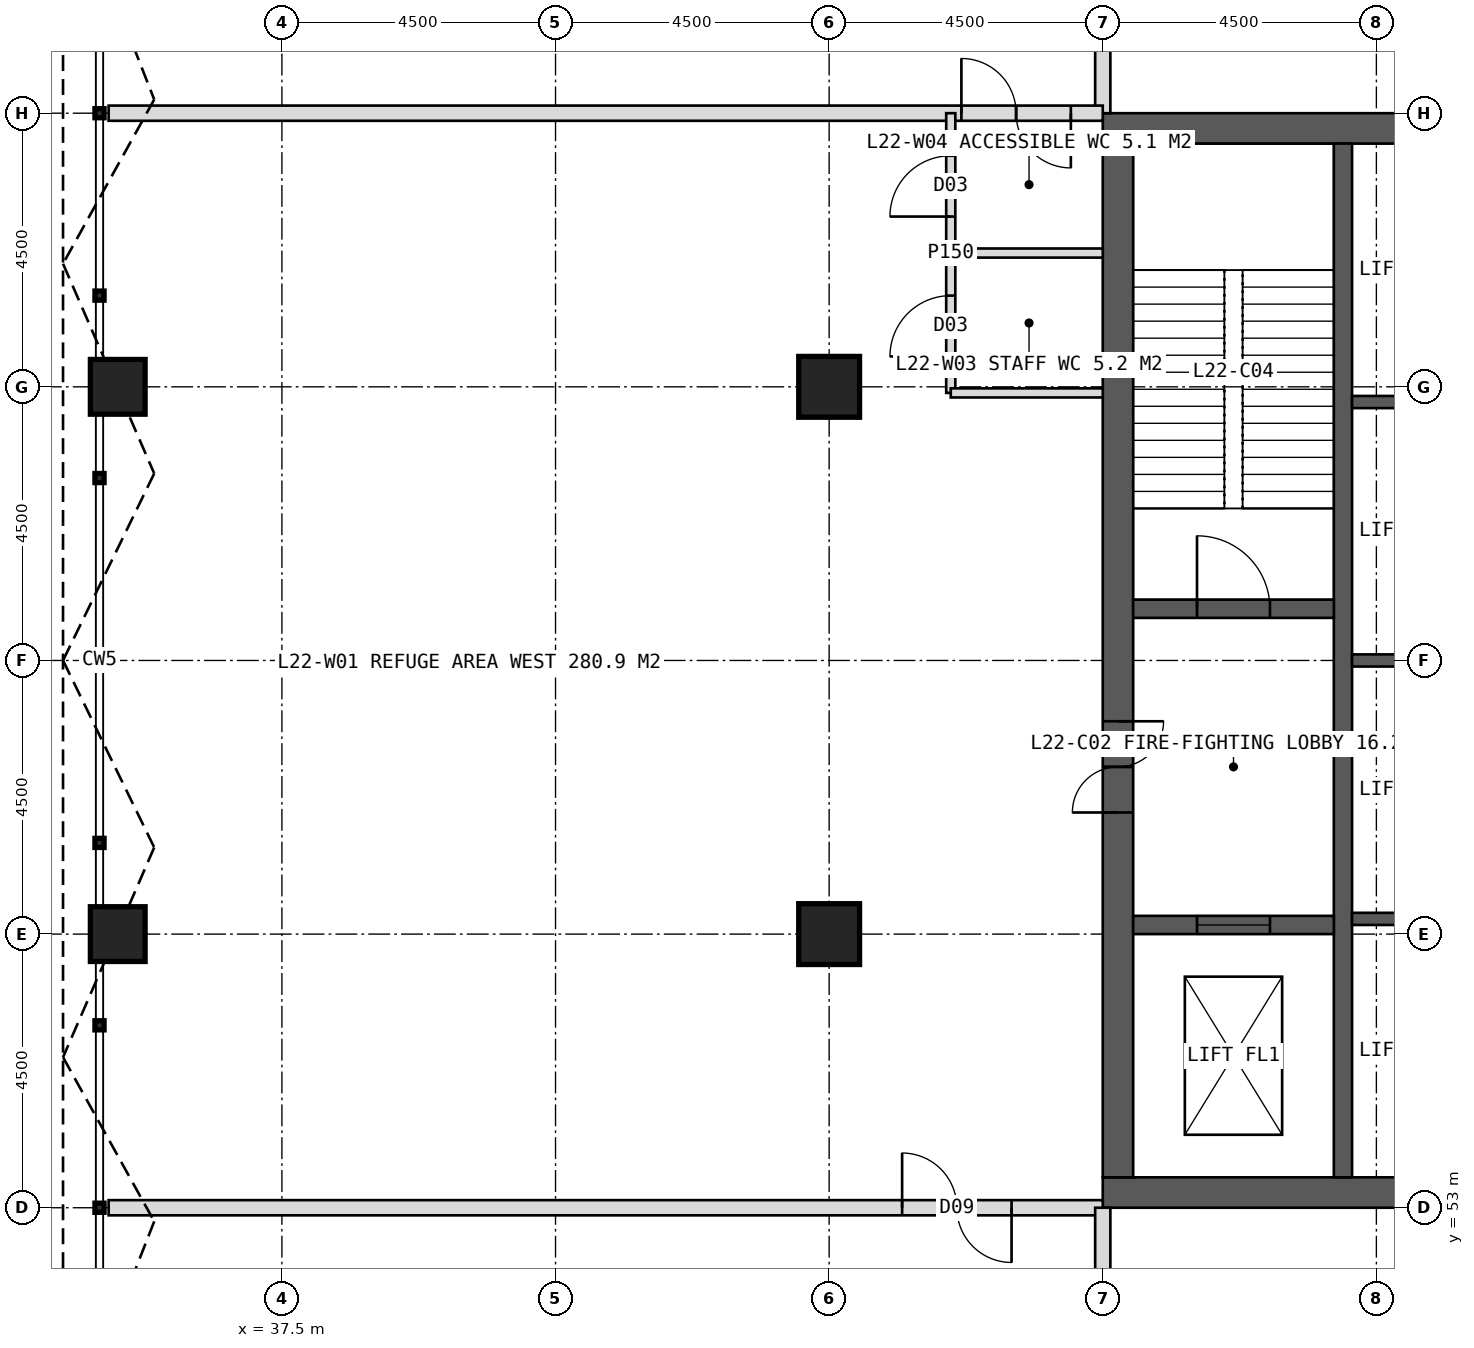
"""IFC4 building model, lengths in metres.
Left out: names, types, materials, properties, quantities, classifications, styles, units other than length and angle.
Written with IfcOpenShell. Run it as: python <this file> out.ifc"""

import sys

from ifc_helpers import new_model, si_unit, direction, frame, frame_2d, origin, origin_2d, place, context, subcontext, project, spatial, rectangle, hollow_rectangle, extrude, element, fill, save


model = new_model("IFC4")
c1 = context("Model", 3, precision=1e-05, world=origin(), true_north=direction((0.0, 1.0)))
c2 = subcontext(c1, "Body", "Model", "MODEL_VIEW")
j1 = project(units=[si_unit("LENGTHUNIT", "METRE"), si_unit("PLANEANGLEUNIT", "RADIAN")], contexts=[c1])
p1 = place(None, origin())
s1 = spatial("IfcSite", under=j1, at=p1, CompositionType="ELEMENT")
p2 = place(p1, origin())
s2 = spatial("IfcBuilding", under=s1, at=p2, CompositionType="ELEMENT")
p3 = place(p2, frame((0.0, 0.0, 95.0)))
s3 = spatial("IfcBuildingStorey", under=s2, at=p3, CompositionType="ELEMENT", Elevation=95.0)
p4 = place(p3, frame((51.0, 70.75, 0.0), z_axis=(0.0, 0.0, 1.0), x_axis=(1.0, 0.0, 0.0)))
e1 = element("IfcWall", 1, at=p4, inside=s3, PredefinedType="SHEAR", context=c2, shape_type="SweptSolid", body=[
    extrude(rectangle(XDim=18.0, YDim=0.5, at=frame_2d((9.0, 0.0))), origin(), (0.0, 0.0, 1.0), 5.0),
])
p5 = place(p4, frame((8.1, 0.0, 0.0)))
e2 = element("IfcOpeningElement", 2, at=p5, cuts=e1, PredefinedType="OPENING", context=c2, shape_type="SweptSolid", body=[
    extrude(rectangle(XDim=1.8, YDim=2.2, at=frame_2d((0.9, 1.1))), frame((0.0, 0.26, 0.0), z_axis=(0.0, -1.0, 0.0), x_axis=(1.0, 0.0, 0.0)), (0.0, 0.0, 1.0), 0.52),
])
p6 = place(p3, frame((51.0, 53.25, 0.0), z_axis=(0.0, 0.0, 1.0), x_axis=(1.0, 0.0, 0.0)))
e3 = element("IfcWall", 3, at=p6, inside=s3, PredefinedType="SHEAR", context=c2, shape_type="SweptSolid", body=[
    extrude(rectangle(XDim=18.0, YDim=0.5, at=frame_2d((9.0, 0.0))), origin(), (0.0, 0.0, 1.0), 5.0),
])
p7 = place(p6, frame((8.1, 0.0, 0.0)))
e4 = element("IfcOpeningElement", 4, at=p7, cuts=e3, PredefinedType="OPENING", context=c2, shape_type="SweptSolid", body=[
    extrude(rectangle(XDim=1.8, YDim=2.2, at=frame_2d((0.9, 1.1))), frame((0.0, 0.26, 0.0), z_axis=(0.0, -1.0, 0.0), x_axis=(1.0, 0.0, 0.0)), (0.0, 0.0, 1.0), 0.52),
])
p8 = place(p3, frame((51.25, 53.5, 0.0), z_axis=(0.0, 0.0, 1.0), x_axis=(0.0, 1.0, 0.0)))
e5 = element("IfcWall", 5, at=p8, inside=s3, PredefinedType="SHEAR", context=c2, shape_type="SweptSolid", body=[
    extrude(rectangle(XDim=17.0, YDim=0.5, at=frame_2d((8.5, 0.0))), origin(), (0.0, 0.0, 1.0), 5.0),
])
p9 = place(p8, frame((6.0, 0.0, 0.0)))
e6 = element("IfcOpeningElement", 6, at=p9, cuts=e5, PredefinedType="OPENING", context=c2, shape_type="SweptSolid", body=[
    extrude(rectangle(XDim=1.5, YDim=2.2, at=frame_2d((0.75, 1.1))), frame((0.0, 0.26, 0.0), z_axis=(0.0, -1.0, 0.0), x_axis=(1.0, 0.0, 0.0)), (0.0, 0.0, 1.0), 0.52),
])
p10 = place(p3, frame((54.95, 53.5, 0.0), z_axis=(0.0, 0.0, 1.0), x_axis=(0.0, 1.0, 0.0)))
e7 = element("IfcWall", 7, at=p10, inside=s3, PredefinedType="SHEAR", context=c2, shape_type="SweptSolid", body=[
    extrude(rectangle(XDim=17.0, YDim=0.3, at=frame_2d((8.5, 0.0))), origin(), (0.0, 0.0, 1.0), 5.0),
])
for number, where, z_axis, x_axis in (
    (8, (55.1, 57.75, 0.0), (0.0, 0.0, 1.0), (1.0, 0.0, 0.0)),
    (9, (55.1, 62.0, 0.0), (0.0, 0.0, 1.0), (1.0, 0.0, 0.0)),
    (10, (55.1, 66.25, 0.0), (0.0, 0.0, 1.0), (1.0, 0.0, 0.0)),
):
    element("IfcWall", number, at=place(p3, frame(where, z_axis=z_axis, x_axis=x_axis)), inside=s3, PredefinedType="SHEAR", context=c2, shape_type="SweptSolid", body=[
        extrude(rectangle(XDim=3.05, YDim=0.2, at=frame_2d((1.525, 0.0))), origin(), (0.0, 0.0, 1.0), 5.0),
    ])
p11 = place(p3, frame((51.5, 62.85, 0.0), z_axis=(0.0, 0.0, 1.0), x_axis=(1.0, 0.0, 0.0)))
e11 = element("IfcWall", 11, at=p11, inside=s3, PredefinedType="SHEAR", context=c2, shape_type="SweptSolid", body=[
    extrude(rectangle(XDim=3.3, YDim=0.3, at=frame_2d((1.65, 0.0))), origin(), (0.0, 0.0, 1.0), 5.0),
])
p12 = place(p11, frame((1.05, 0.0, 0.0)))
e12 = element("IfcOpeningElement", 12, at=p12, cuts=e11, PredefinedType="OPENING", context=c2, shape_type="SweptSolid", body=[
    extrude(rectangle(XDim=1.2, YDim=2.1, at=frame_2d((0.6, 1.05))), frame((0.0, 0.16, 0.0), z_axis=(0.0, -1.0, 0.0), x_axis=(1.0, 0.0, 0.0)), (0.0, 0.0, 1.0), 0.32),
])
p13 = place(p3, frame((51.5, 57.65, 0.0), z_axis=(0.0, 0.0, 1.0), x_axis=(1.0, 0.0, 0.0)))
e13 = element("IfcWall", 13, at=p13, inside=s3, PredefinedType="SHEAR", context=c2, shape_type="SweptSolid", body=[
    extrude(rectangle(XDim=3.3, YDim=0.3, at=frame_2d((1.65, 0.0))), origin(), (0.0, 0.0, 1.0), 5.0),
])
p14 = place(p13, frame((1.05, 0.0, 0.0)))
e14 = element("IfcOpeningElement", 14, at=p14, cuts=e13, PredefinedType="OPENING", context=c2, shape_type="SweptSolid", body=[
    extrude(rectangle(XDim=1.2, YDim=2.2, at=frame_2d((0.6, 1.1))), frame((0.0, 0.16, 0.0), z_axis=(0.0, -1.0, 0.0), x_axis=(1.0, 0.0, 0.0)), (0.0, 0.0, 1.0), 0.32),
])
for number, where, z_axis, x_axis in (
    (15, (46.5, 57.5, 0.0), (0.0, 0.0, 1.0), (1.0, 0.0, 0.0)),
    (16, (46.5, 66.5, 0.0), (0.0, 0.0, 1.0), (1.0, 0.0, 0.0)),
):
    element("IfcColumn", number, at=place(p3, frame(where, z_axis=z_axis, x_axis=x_axis)), inside=s3, PredefinedType="COLUMN", context=c2, shape_type="SweptSolid", body=[
        extrude(hollow_rectangle(XDim=1.0, YDim=1.0, WallThickness=0.1, at=origin_2d()), origin(), (0.0, 0.0, 1.0), 5.0),
    ])
for number, where, z_axis, x_axis in (
    (17, (34.8, 57.5, 0.0), (0.0, 0.0, 1.0), (1.0, 0.0, 0.0)),
    (18, (34.8, 66.5, 0.0), (0.0, 0.0, 1.0), (1.0, 0.0, 0.0)),
):
    element("IfcColumn", number, at=place(p3, frame(where, z_axis=z_axis, x_axis=x_axis)), inside=s3, PredefinedType="COLUMN", context=c2, shape_type="SweptSolid", body=[
        extrude(hollow_rectangle(XDim=0.9, YDim=0.9, WallThickness=0.08, at=origin_2d()), origin(), (0.0, 0.0, 1.0), 5.0),
    ])
p15 = place(p3, frame((51.0, 71.0, 0.0), z_axis=(0.0, 0.0, 1.0), x_axis=(0.0, 1.0, 0.0)))
e19 = element("IfcWall", 19, at=p15, inside=s3, PredefinedType="SOLIDWALL", context=c2, shape_type="SweptSolid", body=[
    extrude(rectangle(XDim=16.35, YDim=0.25, at=frame_2d((8.175, 0.0))), origin(), (0.0, 0.0, 1.0), 4.75),
])
p16 = place(p15, frame((1.5, 0.0, 0.0)))
e20 = element("IfcOpeningElement", 20, at=p16, cuts=e19, PredefinedType="OPENING", context=c2, shape_type="SweptSolid", body=[
    extrude(rectangle(XDim=1.8, YDim=2.2, at=frame_2d((0.9, 1.1))), frame((0.0, 0.135, 0.0), z_axis=(0.0, -1.0, 0.0), x_axis=(1.0, 0.0, 0.0)), (0.0, 0.0, 1.0), 0.27),
])
p17 = place(p3, frame((51.0, 71.0, 0.0), z_axis=(0.0, 0.0, 1.0), x_axis=(-1.0, 0.0, 0.0)))
e21 = element("IfcWall", 21, at=p17, inside=s3, PredefinedType="SOLIDWALL", context=c2, shape_type="SweptSolid", body=[
    extrude(rectangle(XDim=16.35, YDim=0.25, at=frame_2d((8.175, 0.0))), origin(), (0.0, 0.0, 1.0), 4.75),
])
p18 = place(p17, frame((0.525, 0.0, 0.0)))
e22 = element("IfcOpeningElement", 22, at=p18, cuts=e21, PredefinedType="OPENING", context=c2, shape_type="SweptSolid", body=[
    extrude(rectangle(XDim=1.8, YDim=2.2, at=frame_2d((0.9, 1.1))), frame((0.0, 0.135, 0.0), z_axis=(0.0, -1.0, 0.0), x_axis=(1.0, 0.0, 0.0)), (0.0, 0.0, 1.0), 0.27),
])
p19 = place(p3, frame((51.0, 53.0, 0.0), z_axis=(0.0, 0.0, 1.0), x_axis=(-1.0, 0.0, 0.0)))
e23 = element("IfcWall", 23, at=p19, inside=s3, PredefinedType="SOLIDWALL", context=c2, shape_type="SweptSolid", body=[
    extrude(rectangle(XDim=16.35, YDim=0.25, at=frame_2d((8.175, 0.0))), origin(), (0.0, 0.0, 1.0), 4.75),
])
p20 = place(p19, frame((1.5, 0.0, 0.0)))
e24 = element("IfcOpeningElement", 24, at=p20, cuts=e23, PredefinedType="OPENING", context=c2, shape_type="SweptSolid", body=[
    extrude(rectangle(XDim=1.8, YDim=2.2, at=frame_2d((0.9, 1.1))), frame((0.0, 0.135, 0.0), z_axis=(0.0, -1.0, 0.0), x_axis=(1.0, 0.0, 0.0)), (0.0, 0.0, 1.0), 0.27),
])
p21 = place(p3, frame((51.0, 53.0, 0.0), z_axis=(0.0, 0.0, 1.0), x_axis=(0.0, -1.0, 0.0)))
e25 = element("IfcWall", 25, at=p21, inside=s3, PredefinedType="SOLIDWALL", context=c2, shape_type="SweptSolid", body=[
    extrude(rectangle(XDim=16.35, YDim=0.25, at=frame_2d((8.175, 0.0))), origin(), (0.0, 0.0, 1.0), 4.75),
])
p22 = place(p21, frame((1.5, 0.0, 0.0)))
e26 = element("IfcOpeningElement", 26, at=p22, cuts=e25, PredefinedType="OPENING", context=c2, shape_type="SweptSolid", body=[
    extrude(rectangle(XDim=1.8, YDim=2.2, at=frame_2d((0.9, 1.1))), frame((0.0, 0.135, 0.0), z_axis=(0.0, -1.0, 0.0), x_axis=(1.0, 0.0, 0.0)), (0.0, 0.0, 1.0), 0.27),
])
p23 = place(p3, frame((48.5, 66.4, 0.0), z_axis=(0.0, 0.0, 1.0), x_axis=(0.0, 1.0, 0.0)))
e27 = element("IfcWall", 27, at=p23, inside=s3, PredefinedType="PARTITIONING", context=c2, shape_type="SweptSolid", body=[
    extrude(rectangle(XDim=4.6, YDim=0.15, at=frame_2d((2.3, 0.0))), origin(), (0.0, 0.0, 1.0), 4.75),
])
p24 = place(p23, frame((0.6, 0.0, 0.0)))
e28 = element("IfcOpeningElement", 28, at=p24, cuts=e27, PredefinedType="OPENING", context=c2, shape_type="SweptSolid", body=[
    extrude(rectangle(XDim=1.0, YDim=2.1, at=frame_2d((0.5, 1.05))), frame((0.0, 0.085, 0.0), z_axis=(0.0, -1.0, 0.0), x_axis=(1.0, 0.0, 0.0)), (0.0, 0.0, 1.0), 0.17),
])
p25 = place(p23, frame((2.9, 0.0, 0.0)))
e29 = element("IfcOpeningElement", 29, at=p25, cuts=e27, PredefinedType="OPENING", context=c2, shape_type="SweptSolid", body=[
    extrude(rectangle(XDim=1.0, YDim=2.1, at=frame_2d((0.5, 1.05))), frame((0.0, 0.085, 0.0), z_axis=(0.0, -1.0, 0.0), x_axis=(1.0, 0.0, 0.0)), (0.0, 0.0, 1.0), 0.17),
])
p26 = place(p3, frame((51.0, 66.4, 0.0), z_axis=(0.0, 0.0, 1.0), x_axis=(-1.0, 0.0, 0.0)))
e30 = element("IfcWall", 30, at=p26, inside=s3, PredefinedType="PARTITIONING", context=c2, shape_type="SweptSolid", body=[
    extrude(rectangle(XDim=2.5, YDim=0.15, at=frame_2d((1.25, 0.0))), origin(), (0.0, 0.0, 1.0), 3.25),
])
p27 = place(p3, frame((51.0, 68.7, 0.0), z_axis=(0.0, 0.0, 1.0), x_axis=(-1.0, 0.0, 0.0)))
e31 = element("IfcWall", 31, at=p27, inside=s3, PredefinedType="PARTITIONING", context=c2, shape_type="SweptSolid", body=[
    extrude(rectangle(XDim=2.5, YDim=0.15, at=frame_2d((1.25, 0.0))), origin(), (0.0, 0.0, 1.0), 4.75),
])
p28 = place(p18, origin())
e32 = element("IfcDoor", 32, at=p28, inside=s3, OperationType="DOUBLE_DOOR_SINGLE_SWING", PredefinedType="DOOR", context=c2, shape_type="SweptSolid", body=[
    extrude(rectangle(XDim=1.8, YDim=2.2, at=frame_2d((0.9, 1.1))), frame((0.0, 0.025, 0.0), z_axis=(0.0, -1.0, 0.0), x_axis=(1.0, 0.0, 0.0)), (0.0, 0.0, 1.0), 0.05),
])
fill(e22, e32)
p29 = place(p20, origin())
e33 = element("IfcDoor", 33, at=p29, inside=s3, OperationType="DOUBLE_DOOR_SINGLE_SWING", PredefinedType="DOOR", context=c2, shape_type="SweptSolid", body=[
    extrude(rectangle(XDim=1.8, YDim=2.2, at=frame_2d((0.9, 1.1))), frame((0.0, 0.025, 0.0), z_axis=(0.0, -1.0, 0.0), x_axis=(1.0, 0.0, 0.0)), (0.0, 0.0, 1.0), 0.05),
])
fill(e24, e33)
p30 = place(p24, origin())
e34 = element("IfcDoor", 34, at=p30, inside=s3, OperationType="SINGLE_SWING_LEFT", PredefinedType="DOOR", context=c2, shape_type="SweptSolid", body=[
    extrude(rectangle(XDim=1.0, YDim=2.1, at=frame_2d((0.5, 1.05))), frame((0.0, 0.025, 0.0), z_axis=(0.0, -1.0, 0.0), x_axis=(1.0, 0.0, 0.0)), (0.0, 0.0, 1.0), 0.05),
])
fill(e28, e34)
p31 = place(p25, origin())
e35 = element("IfcDoor", 35, at=p31, inside=s3, OperationType="SINGLE_SWING_LEFT", PredefinedType="DOOR", context=c2, shape_type="SweptSolid", body=[
    extrude(rectangle(XDim=1.0, YDim=2.1, at=frame_2d((0.5, 1.05))), frame((0.0, 0.025, 0.0), z_axis=(0.0, -1.0, 0.0), x_axis=(1.0, 0.0, 0.0)), (0.0, 0.0, 1.0), 0.05),
])
fill(e29, e35)
p32 = place(p9, origin())
e36 = element("IfcDoor", 36, at=p32, inside=s3, OperationType="DOUBLE_DOOR_SINGLE_SWING", PredefinedType="DOOR", context=c2, shape_type="SweptSolid", body=[
    extrude(rectangle(XDim=1.5, YDim=2.2, at=frame_2d((0.75, 1.1))), frame((0.0, 0.025, 0.0), z_axis=(0.0, -1.0, 0.0), x_axis=(1.0, 0.0, 0.0)), (0.0, 0.0, 1.0), 0.05),
])
fill(e6, e36)
p33 = place(p12, origin())
e37 = element("IfcDoor", 37, at=p33, inside=s3, OperationType="SINGLE_SWING_LEFT", PredefinedType="DOOR", context=c2, shape_type="SweptSolid", body=[
    extrude(rectangle(XDim=1.2, YDim=2.1, at=frame_2d((0.6, 1.05))), frame((0.0, 0.025, 0.0), z_axis=(0.0, -1.0, 0.0), x_axis=(1.0, 0.0, 0.0)), (0.0, 0.0, 1.0), 0.05),
])
fill(e12, e37)
p34 = place(p14, origin())
e38 = element("IfcDoor", 38, at=p34, inside=s3, OperationType="SLIDING_TO_LEFT", PredefinedType="DOOR", context=c2, shape_type="SweptSolid", body=[
    extrude(rectangle(XDim=1.2, YDim=2.2, at=frame_2d((0.6, 1.1))), frame((0.0, 0.025, 0.0), z_axis=(0.0, -1.0, 0.0), x_axis=(1.0, 0.0, 0.0)), (0.0, 0.0, 1.0), 0.05),
])
fill(e14, e38)
save(model, sys.argv[1])
